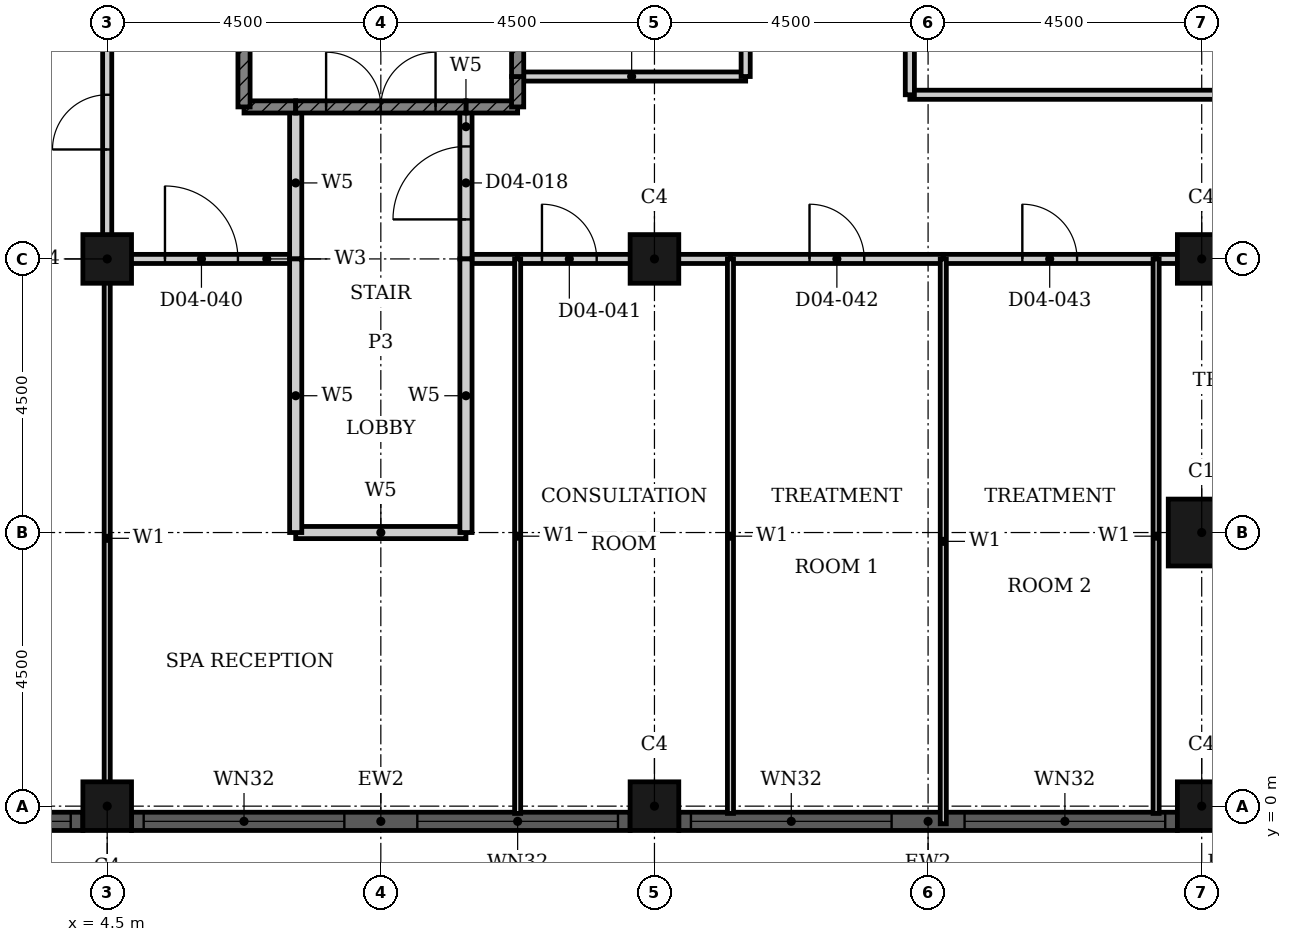
"""IFC4 building model, lengths in metres.
Left out: names, types, materials, properties, quantities, classifications, styles, units other than length and angle.
Written with IfcOpenShell. Run it as: python <this file> out.ifc"""

import sys

from ifc_helpers import new_model, si_unit, direction, frame, frame_2d, origin, origin_2d, place, context, subcontext, project, spatial, rectangle, hollow_rectangle, extrude, element, fill, save


model = new_model("IFC4")
c1 = context("Model", 3, precision=1e-05, world=origin(), true_north=direction((0.0, 1.0)))
c2 = subcontext(c1, "Body", "Model", "MODEL_VIEW")
j1 = project(units=[si_unit("LENGTHUNIT", "METRE"), si_unit("PLANEANGLEUNIT", "RADIAN")], contexts=[c1])
p1 = place(None, origin())
s1 = spatial("IfcSite", under=j1, at=p1, CompositionType="ELEMENT")
p2 = place(p1, origin())
s2 = spatial("IfcBuilding", under=s1, at=p2, CompositionType="ELEMENT")
p3 = place(p2, frame((0.0, 0.0, 24.0)))
s3 = spatial("IfcBuildingStorey", under=s2, at=p3, CompositionType="ELEMENT", Elevation=24.0)
p4 = place(p3, frame((22.5, 4.5, 0.0), z_axis=(0.0, 0.0, 1.0), x_axis=(1.0, 0.0, 0.0)))
e1 = element("IfcColumn", 1, at=p4, inside=s3, PredefinedType="COLUMN", context=c2, shape_type="SweptSolid", body=[
    extrude(hollow_rectangle(XDim=1.1, YDim=1.1, WallThickness=0.036, at=origin_2d()), origin(), (0.0, 0.0, 1.0), 4.8),
])
for number, where, z_axis, x_axis in (
    (2, (4.5, 0.0, 0.0), (0.0, 0.0, 1.0), (1.0, 0.0, 0.0)),
    (3, (13.5, 0.0, 0.0), (0.0, 0.0, 1.0), (1.0, 0.0, 0.0)),
    (4, (22.5, 0.0, 0.0), (0.0, 0.0, 1.0), (1.0, 0.0, 0.0)),
    (5, (4.5, 9.0, 0.0), (0.0, 0.0, 1.0), (1.0, 0.0, 0.0)),
    (6, (13.5, 9.0, 0.0), (0.0, 0.0, 1.0), (1.0, 0.0, 0.0)),
    (7, (22.5, 9.0, 0.0), (0.0, 0.0, 1.0), (1.0, 0.0, 0.0)),
):
    element("IfcColumn", number, at=place(p3, frame(where, z_axis=z_axis, x_axis=x_axis)), inside=s3, PredefinedType="COLUMN", context=c2, shape_type="SweptSolid", body=[
        extrude(hollow_rectangle(XDim=0.8, YDim=0.8, WallThickness=0.025, at=origin_2d()), origin(), (0.0, 0.0, 1.0), 4.8),
    ])
p5 = place(p3, frame((-4.1, -0.25, 0.0), z_axis=(0.0, 0.0, 1.0), x_axis=(1.0, 0.0, 0.0)))
e8 = element("IfcWall", 8, at=p5, inside=s3, PredefinedType="SOLIDWALL", context=c2, shape_type="SweptSolid", body=[
    extrude(rectangle(XDim=8.2, YDim=0.3, at=frame_2d((4.1, 0.0))), origin(), (0.0, 0.0, 1.0), 4.8),
])
p6 = place(p5, frame((0.2, 0.0, 0.9)))
e9 = element("IfcOpeningElement", 9, at=p6, cuts=e8, PredefinedType="OPENING", context=c2, shape_type="SweptSolid", body=[
    extrude(rectangle(XDim=3.3, YDim=2.9, at=frame_2d((1.65, 1.45))), frame((0.0, 0.16, 0.0), z_axis=(0.0, -1.0, 0.0), x_axis=(1.0, 0.0, 0.0)), (0.0, 0.0, 1.0), 0.32),
])
p7 = place(p5, frame((4.7, 0.0, 0.9)))
e10 = element("IfcOpeningElement", 10, at=p7, cuts=e8, PredefinedType="OPENING", context=c2, shape_type="SweptSolid", body=[
    extrude(rectangle(XDim=3.3, YDim=2.9, at=frame_2d((1.65, 1.45))), frame((0.0, 0.16, 0.0), z_axis=(0.0, -1.0, 0.0), x_axis=(1.0, 0.0, 0.0)), (0.0, 0.0, 1.0), 0.32),
])
p8 = place(p3, frame((4.9, -0.25, 0.0), z_axis=(0.0, 0.0, 1.0), x_axis=(1.0, 0.0, 0.0)))
e11 = element("IfcWall", 11, at=p8, inside=s3, PredefinedType="SOLIDWALL", context=c2, shape_type="SweptSolid", body=[
    extrude(rectangle(XDim=8.2, YDim=0.3, at=frame_2d((4.1, 0.0))), origin(), (0.0, 0.0, 1.0), 4.8),
])
p9 = place(p8, frame((0.2, 0.0, 0.9)))
e12 = element("IfcOpeningElement", 12, at=p9, cuts=e11, PredefinedType="OPENING", context=c2, shape_type="SweptSolid", body=[
    extrude(rectangle(XDim=3.3, YDim=2.9, at=frame_2d((1.65, 1.45))), frame((0.0, 0.16, 0.0), z_axis=(0.0, -1.0, 0.0), x_axis=(1.0, 0.0, 0.0)), (0.0, 0.0, 1.0), 0.32),
])
p10 = place(p8, frame((4.7, 0.0, 0.9)))
e13 = element("IfcOpeningElement", 13, at=p10, cuts=e11, PredefinedType="OPENING", context=c2, shape_type="SweptSolid", body=[
    extrude(rectangle(XDim=3.3, YDim=2.9, at=frame_2d((1.65, 1.45))), frame((0.0, 0.16, 0.0), z_axis=(0.0, -1.0, 0.0), x_axis=(1.0, 0.0, 0.0)), (0.0, 0.0, 1.0), 0.32),
])
p11 = place(p3, frame((13.9, -0.25, 0.0), z_axis=(0.0, 0.0, 1.0), x_axis=(1.0, 0.0, 0.0)))
e14 = element("IfcWall", 14, at=p11, inside=s3, PredefinedType="SOLIDWALL", context=c2, shape_type="SweptSolid", body=[
    extrude(rectangle(XDim=8.2, YDim=0.3, at=frame_2d((4.1, 0.0))), origin(), (0.0, 0.0, 1.0), 4.8),
])
p12 = place(p11, frame((0.2, 0.0, 0.9)))
e15 = element("IfcOpeningElement", 15, at=p12, cuts=e14, PredefinedType="OPENING", context=c2, shape_type="SweptSolid", body=[
    extrude(rectangle(XDim=3.3, YDim=2.9, at=frame_2d((1.65, 1.45))), frame((0.0, 0.16, 0.0), z_axis=(0.0, -1.0, 0.0), x_axis=(1.0, 0.0, 0.0)), (0.0, 0.0, 1.0), 0.32),
])
p13 = place(p11, frame((4.7, 0.0, 0.9)))
e16 = element("IfcOpeningElement", 16, at=p13, cuts=e14, PredefinedType="OPENING", context=c2, shape_type="SweptSolid", body=[
    extrude(rectangle(XDim=3.3, YDim=2.9, at=frame_2d((1.65, 1.45))), frame((0.0, 0.16, 0.0), z_axis=(0.0, -1.0, 0.0), x_axis=(1.0, 0.0, 0.0)), (0.0, 0.0, 1.0), 0.32),
])
p14 = place(p3, frame((17.7, 11.7, 0.0), z_axis=(0.0, 0.0, 1.0), x_axis=(1.0, 0.0, 0.0)))
e17 = element("IfcWall", 17, at=p14, inside=s3, PredefinedType="PARTITIONING", context=c2, shape_type="SweptSolid", body=[
    extrude(rectangle(XDim=15.2, YDim=0.15, at=frame_2d((7.6, 0.0))), origin(), (0.0, 0.0, 1.0), 4.45),
])
p15 = place(p14, frame((7.15, 0.0, 0.0)))
e18 = element("IfcOpeningElement", 18, at=p15, cuts=e17, PredefinedType="OPENING", context=c2, shape_type="SweptSolid", body=[
    extrude(rectangle(XDim=0.9, YDim=2.1, at=frame_2d((0.45, 1.05))), frame((0.0, 0.085, 0.0), z_axis=(0.0, -1.0, 0.0), x_axis=(1.0, 0.0, 0.0)), (0.0, 0.0, 1.0), 0.17),
])
p16 = place(p3, frame((11.25, 12.0, 0.0), z_axis=(0.0, 0.0, 1.0), x_axis=(1.0, 0.0, 0.0)))
e19 = element("IfcWall", 19, at=p16, inside=s3, PredefinedType="PARTITIONING", context=c2, shape_type="SweptSolid", body=[
    extrude(rectangle(XDim=3.75, YDim=0.15, at=frame_2d((1.875, 0.0))), origin(), (0.0, 0.0, 1.0), 4.45),
])
p17 = place(p3, frame((4.5, 9.0, 0.0), z_axis=(0.0, 0.0, 1.0), x_axis=(1.0, 0.0, 0.0)))
e20 = element("IfcWall", 20, at=p17, inside=s3, PredefinedType="PARTITIONING", context=c2, shape_type="SweptSolid", body=[
    extrude(rectangle(XDim=3.1, YDim=0.15, at=frame_2d((1.55, 0.0))), origin(), (0.0, 0.0, 1.0), 4.45),
])
p18 = place(p17, frame((0.95, 0.0, 0.0)))
e21 = element("IfcOpeningElement", 21, at=p18, cuts=e20, PredefinedType="OPENING", context=c2, shape_type="SweptSolid", body=[
    extrude(rectangle(XDim=1.2, YDim=2.4, at=frame_2d((0.6, 1.2))), frame((0.0, 0.085, 0.0), z_axis=(0.0, -1.0, 0.0), x_axis=(1.0, 0.0, 0.0)), (0.0, 0.0, 1.0), 0.17),
])
p19 = place(p3, frame((10.4, 9.0, 0.0), z_axis=(0.0, 0.0, 1.0), x_axis=(1.0, 0.0, 0.0)))
e22 = element("IfcWall", 22, at=p19, inside=s3, PredefinedType="PARTITIONING", context=c2, shape_type="SweptSolid", body=[
    extrude(rectangle(XDim=0.85, YDim=0.15, at=frame_2d((0.425, 0.0))), origin(), (0.0, 0.0, 1.0), 4.45),
])
p20 = place(p3, frame((11.25, 9.0, 0.0), z_axis=(0.0, 0.0, 1.0), x_axis=(1.0, 0.0, 0.0)))
e23 = element("IfcWall", 23, at=p20, inside=s3, PredefinedType="PARTITIONING", context=c2, shape_type="SweptSolid", body=[
    extrude(rectangle(XDim=3.5, YDim=0.15, at=frame_2d((1.75, 0.0))), origin(), (0.0, 0.0, 1.0), 4.45),
])
p21 = place(p20, frame((0.4, 0.0, 0.0)))
e24 = element("IfcOpeningElement", 24, at=p21, cuts=e23, PredefinedType="OPENING", context=c2, shape_type="SweptSolid", body=[
    extrude(rectangle(XDim=0.9, YDim=2.1, at=frame_2d((0.45, 1.05))), frame((0.0, 0.085, 0.0), z_axis=(0.0, -1.0, 0.0), x_axis=(1.0, 0.0, 0.0)), (0.0, 0.0, 1.0), 0.17),
])
p22 = place(p3, frame((14.75, 9.0, 0.0), z_axis=(0.0, 0.0, 1.0), x_axis=(1.0, 0.0, 0.0)))
e25 = element("IfcWall", 25, at=p22, inside=s3, PredefinedType="PARTITIONING", context=c2, shape_type="SweptSolid", body=[
    extrude(rectangle(XDim=3.5, YDim=0.15, at=frame_2d((1.75, 0.0))), origin(), (0.0, 0.0, 1.0), 4.45),
])
p23 = place(p22, frame((1.3, 0.0, 0.0)))
e26 = element("IfcOpeningElement", 26, at=p23, cuts=e25, PredefinedType="OPENING", context=c2, shape_type="SweptSolid", body=[
    extrude(rectangle(XDim=0.9, YDim=2.1, at=frame_2d((0.45, 1.05))), frame((0.0, 0.085, 0.0), z_axis=(0.0, -1.0, 0.0), x_axis=(1.0, 0.0, 0.0)), (0.0, 0.0, 1.0), 0.17),
])
p24 = place(p3, frame((18.25, 9.0, 0.0), z_axis=(0.0, 0.0, 1.0), x_axis=(1.0, 0.0, 0.0)))
e27 = element("IfcWall", 27, at=p24, inside=s3, PredefinedType="PARTITIONING", context=c2, shape_type="SweptSolid", body=[
    extrude(rectangle(XDim=3.5, YDim=0.15, at=frame_2d((1.75, 0.0))), origin(), (0.0, 0.0, 1.0), 4.45),
])
p25 = place(p24, frame((1.3, 0.0, 0.0)))
e28 = element("IfcOpeningElement", 28, at=p25, cuts=e27, PredefinedType="OPENING", context=c2, shape_type="SweptSolid", body=[
    extrude(rectangle(XDim=0.9, YDim=2.1, at=frame_2d((0.45, 1.05))), frame((0.0, 0.085, 0.0), z_axis=(0.0, -1.0, 0.0), x_axis=(1.0, 0.0, 0.0)), (0.0, 0.0, 1.0), 0.17),
])
p26 = place(p3, frame((21.75, 9.0, 0.0), z_axis=(0.0, 0.0, 1.0), x_axis=(1.0, 0.0, 0.0)))
e29 = element("IfcWall", 29, at=p26, inside=s3, PredefinedType="PARTITIONING", context=c2, shape_type="SweptSolid", body=[
    extrude(rectangle(XDim=3.5, YDim=0.15, at=frame_2d((1.75, 0.0))), origin(), (0.0, 0.0, 1.0), 4.45),
])
p27 = place(p26, frame((1.3, 0.0, 0.0)))
e30 = element("IfcOpeningElement", 30, at=p27, cuts=e29, PredefinedType="OPENING", context=c2, shape_type="SweptSolid", body=[
    extrude(rectangle(XDim=0.9, YDim=2.1, at=frame_2d((0.45, 1.05))), frame((0.0, 0.085, 0.0), z_axis=(0.0, -1.0, 0.0), x_axis=(1.0, 0.0, 0.0)), (0.0, 0.0, 1.0), 0.17),
])
p28 = place(p3, frame((15.0, 12.0, 0.0), z_axis=(0.0, 0.0, 1.0), x_axis=(0.0, 1.0, 0.0)))
e31 = element("IfcWall", 31, at=p28, inside=s3, PredefinedType="PARTITIONING", context=c2, shape_type="SweptSolid", body=[
    extrude(rectangle(XDim=7.5, YDim=0.15, at=frame_2d((3.75, 0.0))), origin(), (0.0, 0.0, 1.0), 4.45),
])
p29 = place(p28, frame((1.8, 0.0, 0.0)))
e32 = element("IfcOpeningElement", 32, at=p29, cuts=e31, PredefinedType="OPENING", context=c2, shape_type="SweptSolid", body=[
    extrude(rectangle(XDim=1.2, YDim=2.4, at=frame_2d((0.6, 1.2))), frame((0.0, 0.085, 0.0), z_axis=(0.0, -1.0, 0.0), x_axis=(1.0, 0.0, 0.0)), (0.0, 0.0, 1.0), 0.17),
])
p30 = place(p3, frame((17.7, 11.7, 0.0), z_axis=(0.0, 0.0, 1.0), x_axis=(0.0, 1.0, 0.0)))
e33 = element("IfcWall", 33, at=p30, inside=s3, PredefinedType="PARTITIONING", context=c2, shape_type="SweptSolid", body=[
    extrude(rectangle(XDim=8.1, YDim=0.15, at=frame_2d((4.05, 0.0))), origin(), (0.0, 0.0, 1.0), 4.45),
])
p31 = place(p3, frame((4.5, 9.0, 0.0), z_axis=(0.0, 0.0, 1.0), x_axis=(0.0, 1.0, 0.0)))
e34 = element("IfcWall", 34, at=p31, inside=s3, PredefinedType="PARTITIONING", context=c2, shape_type="SweptSolid", body=[
    extrude(rectangle(XDim=4.5, YDim=0.15, at=frame_2d((2.25, 0.0))), origin(), (0.0, 0.0, 1.0), 4.45),
])
p32 = place(p31, frame((1.8, 0.0, 0.0)))
e35 = element("IfcOpeningElement", 35, at=p32, cuts=e34, PredefinedType="OPENING", context=c2, shape_type="SweptSolid", body=[
    extrude(rectangle(XDim=0.9, YDim=2.1, at=frame_2d((0.45, 1.05))), frame((0.0, 0.085, 0.0), z_axis=(0.0, -1.0, 0.0), x_axis=(1.0, 0.0, 0.0)), (0.0, 0.0, 1.0), 0.17),
])
for number, where, z_axis, x_axis in (
    (36, (11.25, -0.12, 0.0), (0.0, 0.0, 1.0), (0.0, 1.0, 0.0)),
    (37, (14.75, -0.12, 0.0), (0.0, 0.0, 1.0), (0.0, 1.0, 0.0)),
):
    element("IfcWall", number, at=place(p3, frame(where, z_axis=z_axis, x_axis=x_axis)), inside=s3, PredefinedType="PARTITIONING", context=c2, shape_type="SweptSolid", body=[
        extrude(rectangle(XDim=9.12, YDim=0.1, at=frame_2d((4.56, 0.0))), origin(), (0.0, 0.0, 1.0), 4.45),
    ])
p33 = place(p3, frame((18.25, -0.29, 0.0), z_axis=(0.0, 0.0, 1.0), x_axis=(0.0, 1.0, 0.0)))
e38 = element("IfcWall", 38, at=p33, inside=s3, PredefinedType="PARTITIONING", context=c2, shape_type="SweptSolid", body=[
    extrude(rectangle(XDim=9.29, YDim=0.1, at=frame_2d((4.645, 0.0))), origin(), (0.0, 0.0, 1.0), 4.45),
])
p34 = place(p3, frame((21.75, -0.12, 0.0), z_axis=(0.0, 0.0, 1.0), x_axis=(0.0, 1.0, 0.0)))
e39 = element("IfcWall", 39, at=p34, inside=s3, PredefinedType="PARTITIONING", context=c2, shape_type="SweptSolid", body=[
    extrude(rectangle(XDim=9.12, YDim=0.1, at=frame_2d((4.56, 0.0))), origin(), (0.0, 0.0, 1.0), 4.45),
])
p35 = place(p3, frame((4.5, -0.19, 0.0), z_axis=(0.0, 0.0, 1.0), x_axis=(0.0, 1.0, 0.0)))
e40 = element("IfcWall", 40, at=p35, inside=s3, PredefinedType="PARTITIONING", context=c2, shape_type="SweptSolid", body=[
    extrude(rectangle(XDim=9.19, YDim=0.1, at=frame_2d((4.595, 0.0))), origin(), (0.0, 0.0, 1.0), 4.45),
])
p36 = place(p3, frame((7.6, 4.5, 0.0), z_axis=(0.0, 0.0, 1.0), x_axis=(1.0, 0.0, 0.0)))
e41 = element("IfcWall", 41, at=p36, inside=s3, PredefinedType="PARTITIONING", context=c2, shape_type="SweptSolid", body=[
    extrude(rectangle(XDim=2.8, YDim=0.2, at=frame_2d((1.4, 0.0))), origin(), (0.0, 0.0, 1.0), 4.45),
])
p37 = place(p3, frame((10.4, 9.0, 0.0), z_axis=(0.0, 0.0, 1.0), x_axis=(0.0, 1.0, 0.0)))
e42 = element("IfcWall", 42, at=p37, inside=s3, PredefinedType="PARTITIONING", context=c2, shape_type="SweptSolid", body=[
    extrude(rectangle(XDim=2.5, YDim=0.2, at=frame_2d((1.25, 0.0))), origin(), (0.0, 0.0, 1.0), 4.45),
])
p38 = place(p37, frame((0.65, 0.0, 0.0)))
e43 = element("IfcOpeningElement", 43, at=p38, cuts=e42, PredefinedType="OPENING", context=c2, shape_type="SweptSolid", body=[
    extrude(rectangle(XDim=1.2, YDim=2.1, at=frame_2d((0.6, 1.05))), frame((0.0, 0.11, 0.0), z_axis=(0.0, -1.0, 0.0), x_axis=(1.0, 0.0, 0.0)), (0.0, 0.0, 1.0), 0.22),
])
p39 = place(p3, frame((10.4, 4.5, 0.0), z_axis=(0.0, 0.0, 1.0), x_axis=(0.0, 1.0, 0.0)))
e44 = element("IfcWall", 44, at=p39, inside=s3, PredefinedType="PARTITIONING", context=c2, shape_type="SweptSolid", body=[
    extrude(rectangle(XDim=4.5, YDim=0.2, at=frame_2d((2.25, 0.0))), origin(), (0.0, 0.0, 1.0), 4.45),
])
p40 = place(p3, frame((7.6, 9.0, 0.0), z_axis=(0.0, 0.0, 1.0), x_axis=(0.0, 1.0, 0.0)))
e45 = element("IfcWall", 45, at=p40, inside=s3, PredefinedType="PARTITIONING", context=c2, shape_type="SweptSolid", body=[
    extrude(rectangle(XDim=2.5, YDim=0.2, at=frame_2d((1.25, 0.0))), origin(), (0.0, 0.0, 1.0), 4.45),
])
p41 = place(p3, frame((7.6, 4.5, 0.0), z_axis=(0.0, 0.0, 1.0), x_axis=(0.0, 1.0, 0.0)))
e46 = element("IfcWall", 46, at=p41, inside=s3, PredefinedType="PARTITIONING", context=c2, shape_type="SweptSolid", body=[
    extrude(rectangle(XDim=4.5, YDim=0.2, at=frame_2d((2.25, 0.0))), origin(), (0.0, 0.0, 1.0), 4.45),
])
for number, where, z_axis, x_axis in (
    (47, (6.75, 11.5, 0.0), (0.0, 0.0, 1.0), (1.0, 0.0, 0.0)),
    (48, (10.4, 11.5, 0.0), (0.0, 0.0, 1.0), (1.0, 0.0, 0.0)),
):
    element("IfcWall", number, at=place(p3, frame(where, z_axis=z_axis, x_axis=x_axis)), inside=s3, PredefinedType="SHEAR", context=c2, shape_type="SweptSolid", body=[
        extrude(rectangle(XDim=0.85, YDim=0.2, at=frame_2d((0.425, 0.0))), origin(), (0.0, 0.0, 1.0), 4.45),
    ])
p42 = place(p3, frame((7.6, 11.5, 0.0), z_axis=(0.0, 0.0, 1.0), x_axis=(1.0, 0.0, 0.0)))
e49 = element("IfcWall", 49, at=p42, inside=s3, PredefinedType="SHEAR", context=c2, shape_type="SweptSolid", body=[
    extrude(rectangle(XDim=2.8, YDim=0.2, at=frame_2d((1.4, 0.0))), origin(), (0.0, 0.0, 1.0), 4.45),
])
p43 = place(p42, frame((0.5, 0.0, 0.0)))
e50 = element("IfcOpeningElement", 50, at=p43, cuts=e49, PredefinedType="OPENING", context=c2, shape_type="SweptSolid", body=[
    extrude(rectangle(XDim=1.8, YDim=2.1, at=frame_2d((0.9, 1.05))), frame((0.0, 0.11, 0.0), z_axis=(0.0, -1.0, 0.0), x_axis=(1.0, 0.0, 0.0)), (0.0, 0.0, 1.0), 0.22),
])
p44 = place(p3, frame((11.25, 11.5, 0.0), z_axis=(0.0, 0.0, 1.0), x_axis=(0.0, 1.0, 0.0)))
e51 = element("IfcWall", 51, at=p44, inside=s3, PredefinedType="SHEAR", context=c2, shape_type="SweptSolid", body=[
    extrude(rectangle(XDim=0.5, YDim=0.2, at=frame_2d((0.25, 0.0))), origin(), (0.0, 0.0, 1.0), 4.45),
])
p45 = place(p3, frame((11.25, 12.0, 0.0), z_axis=(0.0, 0.0, 1.0), x_axis=(0.0, 1.0, 0.0)))
e52 = element("IfcWall", 52, at=p45, inside=s3, PredefinedType="SHEAR", context=c2, shape_type="SweptSolid", body=[
    extrude(rectangle(XDim=7.5, YDim=0.2, at=frame_2d((3.75, 0.0))), origin(), (0.0, 0.0, 1.0), 4.45),
])
p46 = place(p3, frame((6.75, 11.5, 0.0), z_axis=(0.0, 0.0, 1.0), x_axis=(0.0, 1.0, 0.0)))
e53 = element("IfcWall", 53, at=p46, inside=s3, PredefinedType="SHEAR", context=c2, shape_type="SweptSolid", body=[
    extrude(rectangle(XDim=8.45, YDim=0.2, at=frame_2d((4.225, 0.0))), origin(), (0.0, 0.0, 1.0), 4.45),
])
p47 = place(p7, origin())
e54 = element("IfcWindow", 54, at=p47, inside=s3, PartitioningType="SINGLE_PANEL", PredefinedType="WINDOW", context=c2, shape_type="SweptSolid", body=[
    extrude(rectangle(XDim=3.3, YDim=2.9, at=frame_2d((1.65, 1.45))), frame((0.0, 0.03, 0.0), z_axis=(0.0, -1.0, 0.0), x_axis=(1.0, 0.0, 0.0)), (0.0, 0.0, 1.0), 0.06),
])
fill(e10, e54)
p48 = place(p9, origin())
e55 = element("IfcWindow", 55, at=p48, inside=s3, PartitioningType="SINGLE_PANEL", PredefinedType="WINDOW", context=c2, shape_type="SweptSolid", body=[
    extrude(rectangle(XDim=3.3, YDim=2.9, at=frame_2d((1.65, 1.45))), frame((0.0, 0.03, 0.0), z_axis=(0.0, -1.0, 0.0), x_axis=(1.0, 0.0, 0.0)), (0.0, 0.0, 1.0), 0.06),
])
fill(e12, e55)
p49 = place(p10, origin())
e56 = element("IfcWindow", 56, at=p49, inside=s3, PartitioningType="SINGLE_PANEL", PredefinedType="WINDOW", context=c2, shape_type="SweptSolid", body=[
    extrude(rectangle(XDim=3.3, YDim=2.9, at=frame_2d((1.65, 1.45))), frame((0.0, 0.03, 0.0), z_axis=(0.0, -1.0, 0.0), x_axis=(1.0, 0.0, 0.0)), (0.0, 0.0, 1.0), 0.06),
])
fill(e13, e56)
p50 = place(p12, origin())
e57 = element("IfcWindow", 57, at=p50, inside=s3, PartitioningType="SINGLE_PANEL", PredefinedType="WINDOW", context=c2, shape_type="SweptSolid", body=[
    extrude(rectangle(XDim=3.3, YDim=2.9, at=frame_2d((1.65, 1.45))), frame((0.0, 0.03, 0.0), z_axis=(0.0, -1.0, 0.0), x_axis=(1.0, 0.0, 0.0)), (0.0, 0.0, 1.0), 0.06),
])
fill(e15, e57)
p51 = place(p13, origin())
e58 = element("IfcWindow", 58, at=p51, inside=s3, PartitioningType="SINGLE_PANEL", PredefinedType="WINDOW", context=c2, shape_type="SweptSolid", body=[
    extrude(rectangle(XDim=3.3, YDim=2.9, at=frame_2d((1.65, 1.45))), frame((0.0, 0.03, 0.0), z_axis=(0.0, -1.0, 0.0), x_axis=(1.0, 0.0, 0.0)), (0.0, 0.0, 1.0), 0.06),
])
fill(e16, e58)
p52 = place(p38, origin())
e59 = element("IfcDoor", 59, at=p52, inside=s3, OperationType="SINGLE_SWING_LEFT", PredefinedType="DOOR", context=c2, shape_type="SweptSolid", body=[
    extrude(rectangle(XDim=1.2, YDim=2.1, at=frame_2d((0.6, 1.05))), frame((0.0, 0.025, 0.0), z_axis=(0.0, -1.0, 0.0), x_axis=(1.0, 0.0, 0.0)), (0.0, 0.0, 1.0), 0.05),
])
fill(e43, e59)
p53 = place(p43, origin())
e60 = element("IfcDoor", 60, at=p53, inside=s3, OperationType="DOUBLE_DOOR_SINGLE_SWING", PredefinedType="DOOR", context=c2, shape_type="SweptSolid", body=[
    extrude(rectangle(XDim=1.8, YDim=2.1, at=frame_2d((0.9, 1.05))), frame((0.0, 0.025, 0.0), z_axis=(0.0, -1.0, 0.0), x_axis=(1.0, 0.0, 0.0)), (0.0, 0.0, 1.0), 0.05),
])
fill(e50, e60)
p54 = place(p32, origin())
e61 = element("IfcDoor", 61, at=p54, inside=s3, OperationType="SINGLE_SWING_RIGHT", PredefinedType="DOOR", context=c2, shape_type="SweptSolid", body=[
    extrude(rectangle(XDim=0.9, YDim=2.1, at=frame_2d((0.45, 1.05))), frame((0.0, 0.025, 0.0), z_axis=(0.0, -1.0, 0.0), x_axis=(1.0, 0.0, 0.0)), (0.0, 0.0, 1.0), 0.05),
])
fill(e35, e61)
p55 = place(p18, origin())
e62 = element("IfcDoor", 62, at=p55, inside=s3, OperationType="SINGLE_SWING_RIGHT", PredefinedType="DOOR", context=c2, shape_type="SweptSolid", body=[
    extrude(rectangle(XDim=1.2, YDim=2.4, at=frame_2d((0.6, 1.2))), frame((0.0, 0.025, 0.0), z_axis=(0.0, -1.0, 0.0), x_axis=(1.0, 0.0, 0.0)), (0.0, 0.0, 1.0), 0.05),
])
fill(e21, e62)
p56 = place(p21, origin())
e63 = element("IfcDoor", 63, at=p56, inside=s3, OperationType="SINGLE_SWING_LEFT", PredefinedType="DOOR", context=c2, shape_type="SweptSolid", body=[
    extrude(rectangle(XDim=0.9, YDim=2.1, at=frame_2d((0.45, 1.05))), frame((0.0, 0.025, 0.0), z_axis=(0.0, -1.0, 0.0), x_axis=(1.0, 0.0, 0.0)), (0.0, 0.0, 1.0), 0.05),
])
fill(e24, e63)
p57 = place(p23, origin())
e64 = element("IfcDoor", 64, at=p57, inside=s3, OperationType="SINGLE_SWING_LEFT", PredefinedType="DOOR", context=c2, shape_type="SweptSolid", body=[
    extrude(rectangle(XDim=0.9, YDim=2.1, at=frame_2d((0.45, 1.05))), frame((0.0, 0.025, 0.0), z_axis=(0.0, -1.0, 0.0), x_axis=(1.0, 0.0, 0.0)), (0.0, 0.0, 1.0), 0.05),
])
fill(e26, e64)
p58 = place(p25, origin())
e65 = element("IfcDoor", 65, at=p58, inside=s3, OperationType="SINGLE_SWING_RIGHT", PredefinedType="DOOR", context=c2, shape_type="SweptSolid", body=[
    extrude(rectangle(XDim=0.9, YDim=2.1, at=frame_2d((0.45, 1.05))), frame((0.0, 0.025, 0.0), z_axis=(0.0, -1.0, 0.0), x_axis=(1.0, 0.0, 0.0)), (0.0, 0.0, 1.0), 0.05),
])
fill(e28, e65)
save(model, sys.argv[1])
